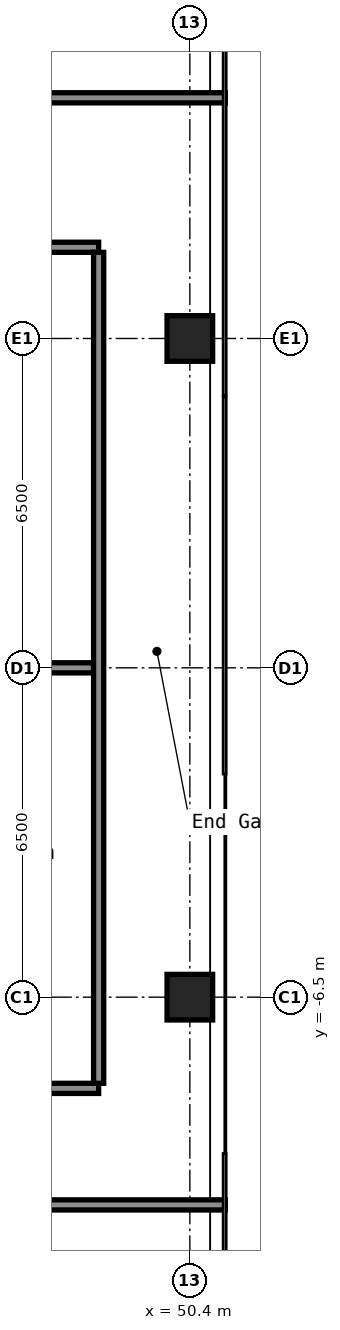
"""IFC4 building model, lengths in metres.
Left out: names, types, materials, properties, quantities, classifications, styles, units other than length and angle.
Written with IfcOpenShell. Run it as: python <this file> out.ifc"""

import sys

from ifc_helpers import new_model, si_unit, direction, frame, frame_2d, origin, origin_2d, place, context, subcontext, project, spatial, rectangle, hollow_rectangle, extrude, element, save


model = new_model("IFC4")
c1 = context("Model", 3, precision=1e-05, world=origin(), true_north=direction((0.0, 1.0)))
c2 = subcontext(c1, "Body", "Model", "MODEL_VIEW")
j1 = project(units=[si_unit("LENGTHUNIT", "METRE"), si_unit("PLANEANGLEUNIT", "RADIAN")], contexts=[c1])
p1 = place(None, origin())
s1 = spatial("IfcSite", under=j1, at=p1, CompositionType="ELEMENT")
p2 = place(p1, origin())
s2 = spatial("IfcBuilding", under=s1, at=p2, CompositionType="ELEMENT")
p3 = place(p2, frame((0.0, 0.0, 64.6)))
s3 = spatial("IfcBuildingStorey", under=s2, at=p3, CompositionType="ELEMENT", Elevation=64.6)
for number, where, z_axis, x_axis in (
    (1, (50.4, -6.5, 0.0), (0.0, 0.0, 1.0), (1.0, 0.0, 0.0)),
    (2, (50.4, 6.5, 0.0), (0.0, 0.0, 1.0), (1.0, 0.0, 0.0)),
):
    element("IfcColumn", number, at=place(p3, frame(where, z_axis=z_axis, x_axis=x_axis)), inside=s3, PredefinedType="COLUMN", context=c2, shape_type="SweptSolid", body=[
        extrude(hollow_rectangle(XDim=0.9, YDim=0.9, WallThickness=0.036, at=origin_2d()), origin(), (0.0, 0.0, 1.0), 4.1),
    ])
p4 = place(p3, frame((16.8, -10.6, 0.0), z_axis=(0.0, 0.0, 1.0), x_axis=(1.0, 0.0, 0.0)))
e3 = element("IfcWall", 3, at=p4, inside=s3, PredefinedType="PARTITIONING", context=c2, shape_type="SweptSolid", body=[
    extrude(rectangle(XDim=34.3, YDim=0.2, at=frame_2d((17.15, 0.0))), origin(), (0.0, 0.0, 1.0), 4.1),
])
p5 = place(p4, frame((3.4, 0.0, 0.0)))
e4 = element("IfcOpeningElement", 4, at=p5, cuts=e3, PredefinedType="OPENING", context=c2, shape_type="SweptSolid", body=[
    extrude(rectangle(XDim=1.6, YDim=2.1, at=frame_2d((0.8, 1.05))), frame((0.0, 0.11, 0.0), z_axis=(0.0, -1.0, 0.0), x_axis=(1.0, 0.0, 0.0)), (0.0, 0.0, 1.0), 0.22),
])
p6 = place(p4, frame((11.8, 0.0, 0.0)))
e5 = element("IfcOpeningElement", 5, at=p6, cuts=e3, PredefinedType="OPENING", context=c2, shape_type="SweptSolid", body=[
    extrude(rectangle(XDim=1.6, YDim=2.1, at=frame_2d((0.8, 1.05))), frame((0.0, 0.11, 0.0), z_axis=(0.0, -1.0, 0.0), x_axis=(1.0, 0.0, 0.0)), (0.0, 0.0, 1.0), 0.22),
])
p7 = place(p4, frame((20.2, 0.0, 0.0)))
e6 = element("IfcOpeningElement", 6, at=p7, cuts=e3, PredefinedType="OPENING", context=c2, shape_type="SweptSolid", body=[
    extrude(rectangle(XDim=1.6, YDim=2.1, at=frame_2d((0.8, 1.05))), frame((0.0, 0.11, 0.0), z_axis=(0.0, -1.0, 0.0), x_axis=(1.0, 0.0, 0.0)), (0.0, 0.0, 1.0), 0.22),
])
p8 = place(p4, frame((29.15, 0.0, 0.0)))
e7 = element("IfcOpeningElement", 7, at=p8, cuts=e3, PredefinedType="OPENING", context=c2, shape_type="SweptSolid", body=[
    extrude(rectangle(XDim=0.9, YDim=2.1, at=frame_2d((0.45, 1.05))), frame((0.0, 0.11, 0.0), z_axis=(0.0, -1.0, 0.0), x_axis=(1.0, 0.0, 0.0)), (0.0, 0.0, 1.0), 0.22),
])
p9 = place(p3, frame((33.6, -8.3, 0.0), z_axis=(0.0, 0.0, 1.0), x_axis=(1.0, 0.0, 0.0)))
e8 = element("IfcWall", 8, at=p9, inside=s3, PredefinedType="PARTITIONING", context=c2, shape_type="SweptSolid", body=[
    extrude(rectangle(XDim=15.0, YDim=0.2, at=frame_2d((7.5, 0.0))), origin(), (0.0, 0.0, 1.0), 4.1),
])
p10 = place(p9, frame((3.75, 0.0, 0.0)))
e9 = element("IfcOpeningElement", 9, at=p10, cuts=e8, PredefinedType="OPENING", context=c2, shape_type="SweptSolid", body=[
    extrude(rectangle(XDim=0.9, YDim=2.1, at=frame_2d((0.45, 1.05))), frame((0.0, 0.11, 0.0), z_axis=(0.0, -1.0, 0.0), x_axis=(1.0, 0.0, 0.0)), (0.0, 0.0, 1.0), 0.22),
])
p11 = place(p9, frame((11.25, 0.0, 0.0)))
e10 = element("IfcOpeningElement", 10, at=p11, cuts=e8, PredefinedType="OPENING", context=c2, shape_type="SweptSolid", body=[
    extrude(rectangle(XDim=0.9, YDim=2.1, at=frame_2d((0.45, 1.05))), frame((0.0, 0.11, 0.0), z_axis=(0.0, -1.0, 0.0), x_axis=(1.0, 0.0, 0.0)), (0.0, 0.0, 1.0), 0.22),
])
p12 = place(p3, frame((33.6, 0.0, 0.0), z_axis=(0.0, 0.0, 1.0), x_axis=(1.0, 0.0, 0.0)))
e11 = element("IfcWall", 11, at=p12, inside=s3, PredefinedType="PARTITIONING", context=c2, shape_type="SweptSolid", body=[
    extrude(rectangle(XDim=14.9, YDim=0.2, at=frame_2d((7.45, 0.0))), origin(), (0.0, 0.0, 1.0), 4.1),
])
p13 = place(p3, frame((33.6, 8.3, 0.0), z_axis=(0.0, 0.0, 1.0), x_axis=(1.0, 0.0, 0.0)))
e12 = element("IfcWall", 12, at=p13, inside=s3, PredefinedType="PARTITIONING", context=c2, shape_type="SweptSolid", body=[
    extrude(rectangle(XDim=15.0, YDim=0.2, at=frame_2d((7.5, 0.0))), origin(), (0.0, 0.0, 1.0), 4.1),
])
p14 = place(p13, frame((3.4, 0.0, 0.0)))
e13 = element("IfcOpeningElement", 13, at=p14, cuts=e12, PredefinedType="OPENING", context=c2, shape_type="SweptSolid", body=[
    extrude(rectangle(XDim=1.6, YDim=2.1, at=frame_2d((0.8, 1.05))), frame((0.0, 0.11, 0.0), z_axis=(0.0, -1.0, 0.0), x_axis=(1.0, 0.0, 0.0)), (0.0, 0.0, 1.0), 0.22),
])
p15 = place(p13, frame((11.25, 0.0, 0.0)))
e14 = element("IfcOpeningElement", 14, at=p15, cuts=e12, PredefinedType="OPENING", context=c2, shape_type="SweptSolid", body=[
    extrude(rectangle(XDim=0.9, YDim=2.1, at=frame_2d((0.45, 1.05))), frame((0.0, 0.11, 0.0), z_axis=(0.0, -1.0, 0.0), x_axis=(1.0, 0.0, 0.0)), (0.0, 0.0, 1.0), 0.22),
])
p16 = place(p3, frame((16.8, 11.25, 0.0), z_axis=(0.0, 0.0, 1.0), x_axis=(1.0, 0.0, 0.0)))
e15 = element("IfcWall", 15, at=p16, inside=s3, PredefinedType="PARTITIONING", context=c2, shape_type="SweptSolid", body=[
    extrude(rectangle(XDim=34.3, YDim=0.2, at=frame_2d((17.15, 0.0))), origin(), (0.0, 0.0, 1.0), 4.1),
])
p17 = place(p16, frame((3.75, 0.0, 0.0)))
e16 = element("IfcOpeningElement", 16, at=p17, cuts=e15, PredefinedType="OPENING", context=c2, shape_type="SweptSolid", body=[
    extrude(rectangle(XDim=0.9, YDim=2.1, at=frame_2d((0.45, 1.05))), frame((0.0, 0.11, 0.0), z_axis=(0.0, -1.0, 0.0), x_axis=(1.0, 0.0, 0.0)), (0.0, 0.0, 1.0), 0.22),
])
p18 = place(p16, frame((9.545, 0.0, 0.0)))
e17 = element("IfcOpeningElement", 17, at=p18, cuts=e15, PredefinedType="OPENING", context=c2, shape_type="SweptSolid", body=[
    extrude(rectangle(XDim=0.9, YDim=2.1, at=frame_2d((0.45, 1.05))), frame((0.0, 0.11, 0.0), z_axis=(0.0, -1.0, 0.0), x_axis=(1.0, 0.0, 0.0)), (0.0, 0.0, 1.0), 0.22),
])
p19 = place(p16, frame((13.745, 0.0, 0.0)))
e18 = element("IfcOpeningElement", 18, at=p19, cuts=e15, PredefinedType="OPENING", context=c2, shape_type="SweptSolid", body=[
    extrude(rectangle(XDim=0.9, YDim=2.1, at=frame_2d((0.45, 1.05))), frame((0.0, 0.11, 0.0), z_axis=(0.0, -1.0, 0.0), x_axis=(1.0, 0.0, 0.0)), (0.0, 0.0, 1.0), 0.22),
])
p20 = place(p16, frame((20.55, 0.0, 0.0)))
e19 = element("IfcOpeningElement", 19, at=p20, cuts=e15, PredefinedType="OPENING", context=c2, shape_type="SweptSolid", body=[
    extrude(rectangle(XDim=0.9, YDim=2.1, at=frame_2d((0.45, 1.05))), frame((0.0, 0.11, 0.0), z_axis=(0.0, -1.0, 0.0), x_axis=(1.0, 0.0, 0.0)), (0.0, 0.0, 1.0), 0.22),
])
p21 = place(p16, frame((29.15, 0.0, 0.0)))
e20 = element("IfcOpeningElement", 20, at=p21, cuts=e15, PredefinedType="OPENING", context=c2, shape_type="SweptSolid", body=[
    extrude(rectangle(XDim=0.9, YDim=2.1, at=frame_2d((0.45, 1.05))), frame((0.0, 0.11, 0.0), z_axis=(0.0, -1.0, 0.0), x_axis=(1.0, 0.0, 0.0)), (0.0, 0.0, 1.0), 0.22),
])
p22 = place(p3, frame((48.6, -8.2, 0.0), z_axis=(0.0, 0.0, 1.0), x_axis=(0.0, 1.0, 0.0)))
e21 = element("IfcWall", 21, at=p22, inside=s3, PredefinedType="PARTITIONING", context=c2, shape_type="SweptSolid", body=[
    extrude(rectangle(XDim=16.4, YDim=0.2, at=frame_2d((8.2, 0.0))), origin(), (0.0, 0.0, 1.0), 4.1),
])
save(model, sys.argv[1])
